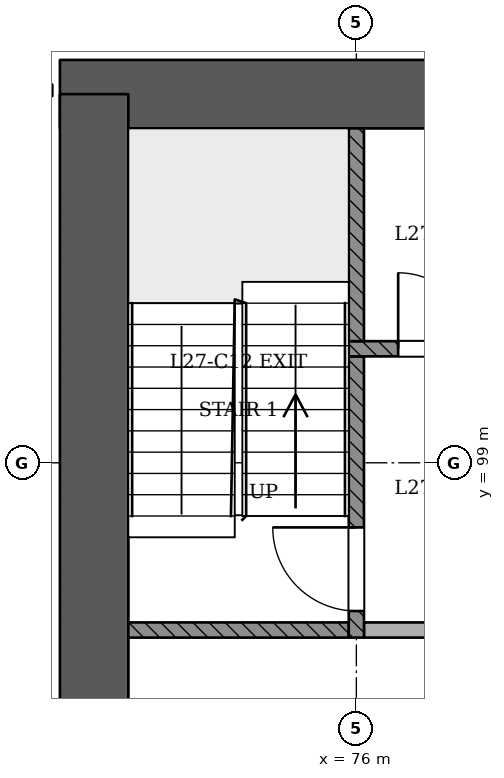
"""IFC4 building model, lengths in metres.
Left out: names, types, materials, properties, quantities, classifications, styles, units other than length and angle.
Written with IfcOpenShell. Run it as: python <this file> out.ifc"""

import sys

from ifc_helpers import new_model, si_unit, direction, frame, frame_2d, origin, place, context, subcontext, project, spatial, rectangle, extrude, element, fill, save


model = new_model("IFC4")
c1 = context("Model", 3, precision=1e-05, world=origin(), true_north=direction((0.0, 1.0)))
c2 = subcontext(c1, "Body", "Model", "MODEL_VIEW")
j1 = project(units=[si_unit("LENGTHUNIT", "METRE"), si_unit("PLANEANGLEUNIT", "RADIAN")], contexts=[c1])
p1 = place(None, origin())
s1 = spatial("IfcSite", under=j1, at=p1, CompositionType="ELEMENT")
p2 = place(p1, origin())
s2 = spatial("IfcBuilding", under=s1, at=p2, CompositionType="ELEMENT")
p3 = place(p2, frame((0.0, 0.0, 108.0)))
s3 = spatial("IfcBuildingStorey", under=s2, at=p3, CompositionType="ELEMENT", Elevation=108.0)
p4 = place(p3, frame((97.45, 103.85, 0.0), z_axis=(0.0, 0.0, 1.0), x_axis=(-1.0, 0.0, 0.0)))
e1 = element("IfcWall", 1, at=p4, inside=s3, PredefinedType="SHEAR", context=c2, shape_type="SweptSolid", body=[
    extrude(rectangle(XDim=25.35, YDim=0.9, at=frame_2d((12.675, 0.0))), origin(), (0.0, 0.0, 1.0), 3.6),
])
p5 = place(p3, frame((72.55, 103.85, 0.0), z_axis=(0.0, 0.0, 1.0), x_axis=(0.0, -1.0, 0.0)))
e2 = element("IfcWall", 2, at=p5, inside=s3, PredefinedType="SHEAR", context=c2, shape_type="SweptSolid", body=[
    extrude(rectangle(XDim=11.35, YDim=0.9, at=frame_2d((5.675, 0.0))), origin(), (0.0, 0.0, 1.0), 3.6),
])
p6 = place(p3, frame((63.866, 97.84, 0.0), z_axis=(0.0, 0.0, 1.0), x_axis=(0.499996899578, -0.866027193807, 0.0)))
e3 = element("IfcWall", 3, at=p6, inside=s3, PredefinedType="PARTITIONING", context=c2, shape_type="SweptSolid", body=[
    extrude(rectangle(XDim=41.505, YDim=0.15, at=frame_2d((20.752, 0.0))), origin(), (0.0, 0.0, 1.0), 2.7),
])
p7 = place(p6, frame((2.792, 0.0, 0.0)))
e4 = element("IfcOpeningElement", 4, at=p7, cuts=e3, PredefinedType="OPENING", context=c2, shape_type="SweptSolid", body=[
    extrude(rectangle(XDim=1.2, YDim=2.1, at=frame_2d((0.6, 1.05))), frame((0.0, 0.085, 0.0), z_axis=(0.0, -1.0, 0.0), x_axis=(1.0, 0.0, 0.0)), (0.0, 0.0, 1.0), 0.171),
])
p8 = place(p6, frame((11.153, 0.0, 0.0)))
e5 = element("IfcOpeningElement", 5, at=p8, cuts=e3, PredefinedType="OPENING", context=c2, shape_type="SweptSolid", body=[
    extrude(rectangle(XDim=1.2, YDim=2.1, at=frame_2d((0.6, 1.05))), frame((0.0, 0.085, 0.0), z_axis=(0.0, -1.0, 0.0), x_axis=(1.0, 0.0, 0.0)), (0.0, 0.0, 1.0), 0.171),
])
p9 = place(p6, frame((22.403, 0.0, 0.0)))
e6 = element("IfcOpeningElement", 6, at=p9, cuts=e3, PredefinedType="OPENING", context=c2, shape_type="SweptSolid", body=[
    extrude(rectangle(XDim=1.2, YDim=2.1, at=frame_2d((0.6, 1.05))), frame((0.0, 0.085, 0.0), z_axis=(0.0, -1.0, 0.0), x_axis=(1.0, 0.0, 0.0)), (0.0, 0.0, 1.0), 0.171),
])
p10 = place(p6, frame((32.553, 0.0, 0.0)))
e7 = element("IfcOpeningElement", 7, at=p10, cuts=e3, PredefinedType="OPENING", context=c2, shape_type="SweptSolid", body=[
    extrude(rectangle(XDim=1.2, YDim=2.1, at=frame_2d((0.6, 1.05))), frame((0.0, 0.085, 0.0), z_axis=(0.0, -1.0, 0.0), x_axis=(1.0, 0.0, 0.0)), (0.0, 0.0, 1.0), 0.171),
])
p11 = place(p6, frame((39.864, 0.0, 0.0)))
e8 = element("IfcOpeningElement", 8, at=p11, cuts=e3, PredefinedType="OPENING", context=c2, shape_type="SweptSolid", body=[
    extrude(rectangle(XDim=1.0, YDim=2.1, at=frame_2d((0.5, 1.05))), frame((0.0, 0.085, 0.0), z_axis=(0.0, -1.0, 0.0), x_axis=(1.0, 0.0, 0.0)), (0.0, 0.0, 1.0), 0.171),
])
p12 = place(p3, frame((73.0, 96.8, 0.0), z_axis=(0.0, 0.0, 1.0), x_axis=(1.0, 0.0, 0.0)))
e9 = element("IfcWall", 9, at=p12, inside=s3, PredefinedType="SOLIDWALL", context=c2, shape_type="SweptSolid", body=[
    extrude(rectangle(XDim=2.9, YDim=0.2, at=frame_2d((1.45, 0.0))), origin(), (0.0, 0.0, 1.0), 3.1),
])
p13 = place(p3, frame((76.0, 96.7, 0.0), z_axis=(0.0, 0.0, 1.0), x_axis=(0.0, 1.0, 0.0)))
e10 = element("IfcWall", 10, at=p13, inside=s3, PredefinedType="SOLIDWALL", context=c2, shape_type="SweptSolid", body=[
    extrude(rectangle(XDim=3.7, YDim=0.2, at=frame_2d((1.85, 0.0))), origin(), (0.0, 0.0, 1.0), 3.1),
])
p14 = place(p13, frame((0.35, 0.0, 0.0)))
e11 = element("IfcOpeningElement", 11, at=p14, cuts=e10, PredefinedType="OPENING", context=c2, shape_type="SweptSolid", body=[
    extrude(rectangle(XDim=1.1, YDim=2.1, at=frame_2d((0.55, 1.05))), frame((0.0, 0.11, 0.0), z_axis=(0.0, -1.0, 0.0), x_axis=(1.0, 0.0, 0.0)), (0.0, 0.0, 1.0), 0.221),
])
p15 = place(p3, frame((76.1, 96.8, 0.0), z_axis=(0.0, 0.0, 1.0), x_axis=(1.0, 0.0, 0.0)))
e12 = element("IfcWall", 12, at=p15, inside=s3, PredefinedType="PARTITIONING", context=c2, shape_type="SweptSolid", body=[
    extrude(rectangle(XDim=1.9, YDim=0.2, at=frame_2d((0.95, 0.0))), origin(), (0.0, 0.0, 1.0), 3.1),
])
p16 = place(p3, frame((75.9, 100.5, 0.0), z_axis=(0.0, 0.0, 1.0), x_axis=(1.0, 0.0, 0.0)))
e13 = element("IfcWall", 13, at=p16, inside=s3, PredefinedType="SOLIDWALL", context=c2, shape_type="SweptSolid", body=[
    extrude(rectangle(XDim=18.2, YDim=0.2, at=frame_2d((9.1, 0.0))), origin(), (0.0, 0.0, 1.0), 3.1),
])
p17 = place(p16, frame((2.6, 0.0, 0.0)))
e14 = element("IfcOpeningElement", 14, at=p17, cuts=e13, PredefinedType="OPENING", context=c2, shape_type="SweptSolid", body=[
    extrude(rectangle(XDim=1.1, YDim=2.1, at=frame_2d((0.55, 1.05))), frame((0.0, 0.11, 0.0), z_axis=(0.0, -1.0, 0.0), x_axis=(1.0, 0.0, 0.0)), (0.0, 0.0, 1.0), 0.221),
])
p18 = place(p16, frame((4.5, 0.0, 0.0)))
e15 = element("IfcOpeningElement", 15, at=p18, cuts=e13, PredefinedType="OPENING", context=c2, shape_type="SweptSolid", body=[
    extrude(rectangle(XDim=1.1, YDim=2.1, at=frame_2d((0.55, 1.05))), frame((0.0, 0.11, 0.0), z_axis=(0.0, -1.0, 0.0), x_axis=(1.0, 0.0, 0.0)), (0.0, 0.0, 1.0), 0.221),
])
p19 = place(p16, frame((6.4, 0.0, 0.0)))
e16 = element("IfcOpeningElement", 16, at=p19, cuts=e13, PredefinedType="OPENING", context=c2, shape_type="SweptSolid", body=[
    extrude(rectangle(XDim=1.1, YDim=2.1, at=frame_2d((0.55, 1.05))), frame((0.0, 0.11, 0.0), z_axis=(0.0, -1.0, 0.0), x_axis=(1.0, 0.0, 0.0)), (0.0, 0.0, 1.0), 0.221),
])
p20 = place(p16, frame((8.3, 0.0, 0.0)))
e17 = element("IfcOpeningElement", 17, at=p20, cuts=e13, PredefinedType="OPENING", context=c2, shape_type="SweptSolid", body=[
    extrude(rectangle(XDim=1.1, YDim=2.1, at=frame_2d((0.55, 1.05))), frame((0.0, 0.11, 0.0), z_axis=(0.0, -1.0, 0.0), x_axis=(1.0, 0.0, 0.0)), (0.0, 0.0, 1.0), 0.221),
])
p21 = place(p16, frame((10.2, 0.0, 0.0)))
e18 = element("IfcOpeningElement", 18, at=p21, cuts=e13, PredefinedType="OPENING", context=c2, shape_type="SweptSolid", body=[
    extrude(rectangle(XDim=1.1, YDim=2.1, at=frame_2d((0.55, 1.05))), frame((0.0, 0.11, 0.0), z_axis=(0.0, -1.0, 0.0), x_axis=(1.0, 0.0, 0.0)), (0.0, 0.0, 1.0), 0.221),
])
p22 = place(p16, frame((12.1, 0.0, 0.0)))
e19 = element("IfcOpeningElement", 19, at=p22, cuts=e13, PredefinedType="OPENING", context=c2, shape_type="SweptSolid", body=[
    extrude(rectangle(XDim=1.1, YDim=2.1, at=frame_2d((0.55, 1.05))), frame((0.0, 0.11, 0.0), z_axis=(0.0, -1.0, 0.0), x_axis=(1.0, 0.0, 0.0)), (0.0, 0.0, 1.0), 0.221),
])
p23 = place(p16, frame((14.0, 0.0, 0.0)))
e20 = element("IfcOpeningElement", 20, at=p23, cuts=e13, PredefinedType="OPENING", context=c2, shape_type="SweptSolid", body=[
    extrude(rectangle(XDim=1.1, YDim=2.1, at=frame_2d((0.55, 1.05))), frame((0.0, 0.11, 0.0), z_axis=(0.0, -1.0, 0.0), x_axis=(1.0, 0.0, 0.0)), (0.0, 0.0, 1.0), 0.221),
])
p24 = place(p16, frame((0.65, 0.0, 0.0)))
e21 = element("IfcOpeningElement", 21, at=p24, cuts=e13, PredefinedType="OPENING", context=c2, shape_type="SweptSolid", body=[
    extrude(rectangle(XDim=1.0, YDim=2.1, at=frame_2d((0.5, 1.05))), frame((0.0, 0.11, 0.0), z_axis=(0.0, -1.0, 0.0), x_axis=(1.0, 0.0, 0.0)), (0.0, 0.0, 1.0), 0.221),
])
p25 = place(p16, frame((16.3, 0.0, 0.0)))
e22 = element("IfcOpeningElement", 22, at=p25, cuts=e13, PredefinedType="OPENING", context=c2, shape_type="SweptSolid", body=[
    extrude(rectangle(XDim=1.0, YDim=2.1, at=frame_2d((0.5, 1.05))), frame((0.0, 0.11, 0.0), z_axis=(0.0, -1.0, 0.0), x_axis=(1.0, 0.0, 0.0)), (0.0, 0.0, 1.0), 0.221),
])
p26 = place(p3, frame((76.0, 100.6, 0.0), z_axis=(0.0, 0.0, 1.0), x_axis=(0.0, 1.0, 0.0)))
e23 = element("IfcWall", 23, at=p26, inside=s3, PredefinedType="SOLIDWALL", context=c2, shape_type="SweptSolid", body=[
    extrude(rectangle(XDim=2.8, YDim=0.2, at=frame_2d((1.4, 0.0))), origin(), (0.0, 0.0, 1.0), 3.1),
])
p27 = place(p14, origin())
e24 = element("IfcDoor", 24, at=p27, inside=s3, OperationType="SINGLE_SWING_RIGHT", PredefinedType="NOTDEFINED", context=c2, shape_type="SweptSolid", body=[
    extrude(rectangle(XDim=1.1, YDim=2.1, at=frame_2d((0.55, 1.05))), frame((0.0, 0.025, 0.0), z_axis=(0.0, -1.0, 0.0), x_axis=(1.0, 0.0, 0.0)), (0.0, 0.0, 1.0), 0.05),
])
fill(e11, e24)
p28 = place(p24, origin())
e25 = element("IfcDoor", 25, at=p28, inside=s3, OperationType="SINGLE_SWING_LEFT", PredefinedType="NOTDEFINED", context=c2, shape_type="SweptSolid", body=[
    extrude(rectangle(XDim=1.0, YDim=2.1, at=frame_2d((0.5, 1.05))), frame((0.0, 0.025, 0.0), z_axis=(0.0, -1.0, 0.0), x_axis=(1.0, 0.0, 0.0)), (0.0, 0.0, 1.0), 0.05),
])
fill(e21, e25)
save(model, sys.argv[1])
